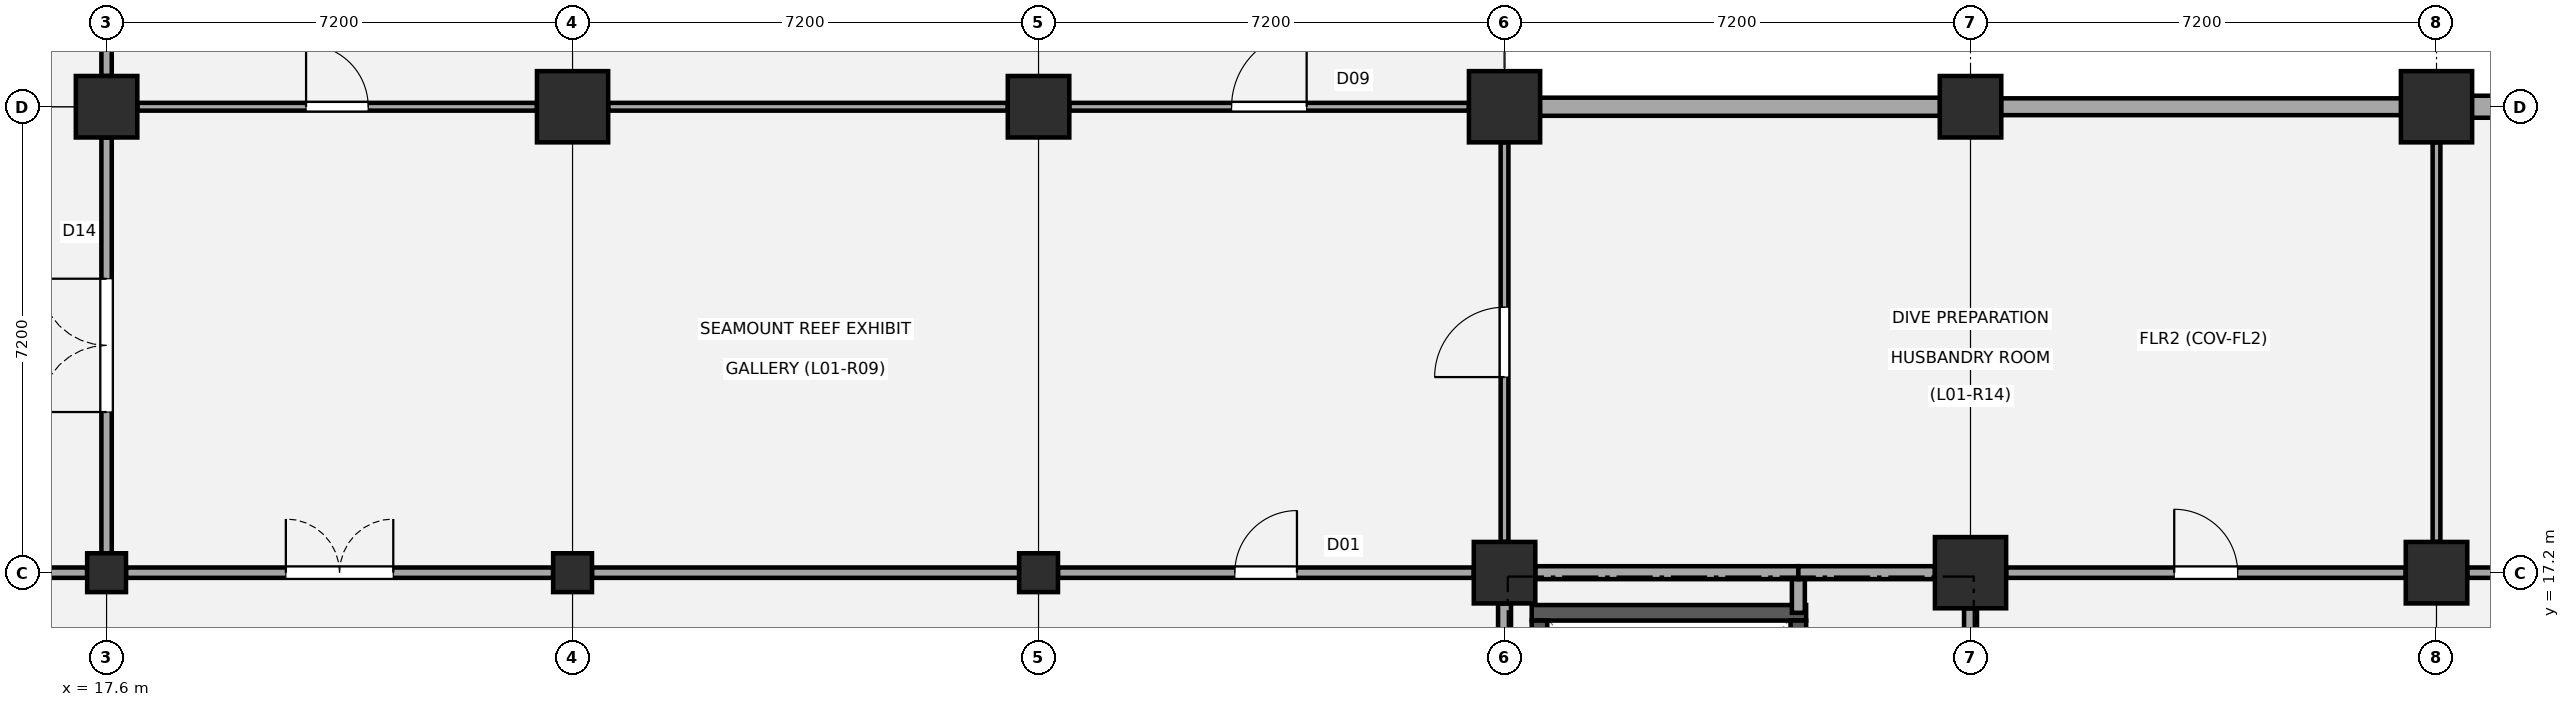
"""IFC4 building model, lengths in metres.
Left out: names, types, materials, properties, quantities, classifications, styles, units other than length and angle.
Written with IfcOpenShell. Run it as: python <this file> out.ifc"""

import sys

from ifc_helpers import new_model, si_unit, direction, frame, frame_2d, origin, origin_2d, place, context, subcontext, project, spatial, rectangle, extrude, element, fill, save


model = new_model("IFC4")
c1 = context("Model", 3, precision=1e-05, world=origin(), true_north=direction((0.0, 1.0)))
c2 = subcontext(c1, "Body", "Model", "MODEL_VIEW")
j1 = project(units=[si_unit("LENGTHUNIT", "METRE"), si_unit("PLANEANGLEUNIT", "RADIAN")], contexts=[c1])
p1 = place(None, origin())
s1 = spatial("IfcSite", under=j1, at=p1, CompositionType="ELEMENT")
p2 = place(p1, origin())
s2 = spatial("IfcBuilding", under=s1, at=p2, CompositionType="ELEMENT")
p3 = place(p2, frame((0.0, 0.0, 4.68)))
s3 = spatial("IfcBuildingStorey", under=s2, at=p3, CompositionType="ELEMENT", Elevation=4.68)
p4 = place(p3, frame((17.6, 17.2, 0.0), z_axis=(0.0, 0.0, 1.0), x_axis=(1.0, 0.0, 0.0)))
e1 = element("IfcColumn", 1, at=p4, inside=s3, PredefinedType="COLUMN", context=c2, shape_type="SweptSolid", body=[
    extrude(rectangle(XDim=0.6, YDim=0.6, at=origin_2d()), origin(), (0.0, 0.0, 1.0), 4.5),
])
p5 = place(p3, frame((17.6, 24.4, 0.0), z_axis=(0.0, 0.0, 1.0), x_axis=(1.0, 0.0, 0.0)))
e2 = element("IfcColumn", 2, at=p5, inside=s3, PredefinedType="COLUMN", context=c2, shape_type="SweptSolid", body=[
    extrude(rectangle(XDim=0.95, YDim=0.95, at=origin_2d()), origin(), (0.0, 0.0, 1.0), 4.5),
])
p6 = place(p3, frame((24.8, 17.2, 0.0), z_axis=(0.0, 0.0, 1.0), x_axis=(1.0, 0.0, 0.0)))
e3 = element("IfcColumn", 3, at=p6, inside=s3, PredefinedType="COLUMN", context=c2, shape_type="SweptSolid", body=[
    extrude(rectangle(XDim=0.6, YDim=0.6, at=origin_2d()), origin(), (0.0, 0.0, 1.0), 4.5),
])
p7 = place(p3, frame((24.8, 24.4, 0.0), z_axis=(0.0, 0.0, 1.0), x_axis=(1.0, 0.0, 0.0)))
e4 = element("IfcColumn", 4, at=p7, inside=s3, PredefinedType="COLUMN", context=c2, shape_type="SweptSolid", body=[
    extrude(rectangle(XDim=1.1, YDim=1.1, at=origin_2d()), origin(), (0.0, 0.0, 1.0), 4.5),
])
p8 = place(p3, frame((32.0, 17.2, 0.0), z_axis=(0.0, 0.0, 1.0), x_axis=(1.0, 0.0, 0.0)))
e5 = element("IfcColumn", 5, at=p8, inside=s3, PredefinedType="COLUMN", context=c2, shape_type="SweptSolid", body=[
    extrude(rectangle(XDim=0.6, YDim=0.6, at=origin_2d()), origin(), (0.0, 0.0, 1.0), 4.5),
])
for number, where, z_axis, x_axis in (
    (6, (32.0, 24.4, 0.0), (0.0, 0.0, 1.0), (1.0, 0.0, 0.0)),
    (7, (39.2, 17.2, 0.0), (0.0, 0.0, 1.0), (1.0, 0.0, 0.0)),
):
    element("IfcColumn", number, at=place(p3, frame(where, z_axis=z_axis, x_axis=x_axis)), inside=s3, PredefinedType="COLUMN", context=c2, shape_type="SweptSolid", body=[
        extrude(rectangle(XDim=0.95, YDim=0.95, at=origin_2d()), origin(), (0.0, 0.0, 1.0), 4.5),
    ])
for number, where, z_axis, x_axis in (
    (8, (39.2, 24.4, 0.0), (0.0, 0.0, 1.0), (1.0, 0.0, 0.0)),
    (9, (46.4, 17.2, 0.0), (0.0, 0.0, 1.0), (1.0, 0.0, 0.0)),
):
    element("IfcColumn", number, at=place(p3, frame(where, z_axis=z_axis, x_axis=x_axis)), inside=s3, PredefinedType="COLUMN", context=c2, shape_type="SweptSolid", body=[
        extrude(rectangle(XDim=1.1, YDim=1.1, at=origin_2d()), origin(), (0.0, 0.0, 1.0), 4.5),
    ])
for number, where, z_axis, x_axis in (
    (10, (46.4, 24.4, 0.0), (0.0, 0.0, 1.0), (1.0, 0.0, 0.0)),
    (11, (53.6, 17.2, 0.0), (0.0, 0.0, 1.0), (1.0, 0.0, 0.0)),
):
    element("IfcColumn", number, at=place(p3, frame(where, z_axis=z_axis, x_axis=x_axis)), inside=s3, PredefinedType="COLUMN", context=c2, shape_type="SweptSolid", body=[
        extrude(rectangle(XDim=0.95, YDim=0.95, at=origin_2d()), origin(), (0.0, 0.0, 1.0), 4.5),
    ])
p9 = place(p3, frame((53.6, 24.4, 0.0), z_axis=(0.0, 0.0, 1.0), x_axis=(1.0, 0.0, 0.0)))
e12 = element("IfcColumn", 12, at=p9, inside=s3, PredefinedType="COLUMN", context=c2, shape_type="SweptSolid", body=[
    extrude(rectangle(XDim=1.1, YDim=1.1, at=origin_2d()), origin(), (0.0, 0.0, 1.0), 4.5),
])
p10 = place(p3, frame((39.745, 24.4, 0.0), z_axis=(0.0, 0.0, 1.0), x_axis=(1.0, 0.0, 0.0)))
e13 = element("IfcWall", 13, at=p10, inside=s3, PredefinedType="STANDARD", context=c2, shape_type="SweptSolid", body=[
    extrude(rectangle(XDim=6.185, YDim=0.28, at=frame_2d((3.092, 0.0))), origin(), (0.0, 0.0, 1.0), 3.51),
])
p11 = place(p3, frame((46.87, 24.4, 0.0), z_axis=(0.0, 0.0, 1.0), x_axis=(1.0, 0.0, 0.0)))
e14 = element("IfcWall", 14, at=p11, inside=s3, PredefinedType="STANDARD", context=c2, shape_type="SweptSolid", body=[
    extrude(rectangle(XDim=6.185, YDim=0.26, at=frame_2d((3.092, 0.0))), origin(), (0.0, 0.0, 1.0), 3.49),
])
p12 = place(p3, frame((54.145, 24.4, 0.0), z_axis=(0.0, 0.0, 1.0), x_axis=(1.0, 0.0, 0.0)))
e15 = element("IfcWall", 15, at=p12, inside=s3, PredefinedType="STANDARD", context=c2, shape_type="SweptSolid", body=[
    extrude(rectangle(XDim=6.185, YDim=0.34, at=frame_2d((3.093, 0.0))), origin(), (0.0, 0.0, 1.0), 3.51),
])
p13 = place(p3, frame((39.62, 16.58, 0.0), z_axis=(0.0, 0.0, 1.0), x_axis=(1.0, 0.0, 0.0)))
e16 = element("IfcWall", 16, at=p13, inside=s3, PredefinedType="SHEAR", context=c2, shape_type="SweptSolid", body=[
    extrude(rectangle(XDim=4.24, YDim=0.24, at=frame_2d((2.12, 0.0))), origin(), (0.0, 0.0, 1.0), 4.2),
])
p14 = place(p3, frame((39.74, 10.74, 0.0), z_axis=(0.0, 0.0, 1.0), x_axis=(0.0, 1.0, 0.0)))
e17 = element("IfcWall", 17, at=p14, inside=s3, PredefinedType="SHEAR", context=c2, shape_type="SweptSolid", body=[
    extrude(rectangle(XDim=5.72, YDim=0.24, at=frame_2d((2.86, 0.0))), origin(), (0.0, 0.0, 1.0), 4.2),
])
p15 = place(p3, frame((43.74, 10.74, 0.0), z_axis=(0.0, 0.0, 1.0), x_axis=(0.0, 1.0, 0.0)))
e18 = element("IfcWall", 18, at=p15, inside=s3, PredefinedType="SHEAR", context=c2, shape_type="SweptSolid", body=[
    extrude(rectangle(XDim=5.72, YDim=0.24, at=frame_2d((2.86, 0.0))), origin(), (0.0, 0.0, 1.0), 4.2),
])
p16 = place(p15, frame((0.22, 0.0, 0.0)))
e19 = element("IfcOpeningElement", 19, at=p16, cuts=e18, PredefinedType="OPENING", context=c2, shape_type="SweptSolid", body=[
    extrude(rectangle(XDim=1.12, YDim=2.15, at=frame_2d((0.56, 1.075))), frame((0.0, 0.13, 0.0), z_axis=(0.0, -1.0, 0.0), x_axis=(1.0, 0.0, 0.0)), (0.0, 0.0, 1.0), 0.26),
])
p17 = place(p3, frame((43.74, 16.58, 0.0), z_axis=(0.0, 0.0, 1.0), x_axis=(0.0, 1.0, 0.0)))
e20 = element("IfcWall", 20, at=p17, inside=s3, PredefinedType="PARTITIONING", context=c2, shape_type="SweptSolid", body=[
    extrude(rectangle(XDim=0.62, YDim=0.2, at=frame_2d((0.31, 0.0))), origin(), (0.0, 0.0, 1.0), 3.59),
])
p18 = place(p3, frame((39.2, 10.55, 0.0), z_axis=(0.0, 0.0, 1.0), x_axis=(0.0, 1.0, 0.0)))
e21 = element("IfcWall", 21, at=p18, inside=s3, PredefinedType="PARTITIONING", context=c2, shape_type="SweptSolid", body=[
    extrude(rectangle(XDim=6.175, YDim=0.2, at=frame_2d((3.087, 0.0))), origin(), (0.0, 0.0, 1.0), 3.59),
])
p19 = place(p3, frame((46.4, 10.475, 0.0), z_axis=(0.0, 0.0, 1.0), x_axis=(0.0, 1.0, 0.0)))
e22 = element("IfcWall", 22, at=p19, inside=s3, PredefinedType="PARTITIONING", context=c2, shape_type="SweptSolid", body=[
    extrude(rectangle(XDim=6.175, YDim=0.2, at=frame_2d((3.087, 0.0))), origin(), (0.0, 0.0, 1.0), 3.59),
])
p20 = place(p19, frame((2.577, 0.0, 0.0)))
e23 = element("IfcOpeningElement", 23, at=p20, cuts=e22, PredefinedType="OPENING", context=c2, shape_type="SweptSolid", body=[
    extrude(rectangle(XDim=1.02, YDim=2.15, at=frame_2d((0.51, 1.075))), frame((0.0, 0.11, 0.0), z_axis=(0.0, -1.0, 0.0), x_axis=(1.0, 0.0, 0.0)), (0.0, 0.0, 1.0), 0.22),
])
p21 = place(p3, frame((39.675, 17.2, 0.0), z_axis=(0.0, 0.0, 1.0), x_axis=(1.0, 0.0, 0.0)))
e24 = element("IfcWall", 24, at=p21, inside=s3, PredefinedType="PARTITIONING", context=c2, shape_type="SweptSolid", body=[
    extrude(rectangle(XDim=4.065, YDim=0.2, at=frame_2d((2.032, 0.0))), origin(), (0.0, 0.0, 1.0), 3.59),
])
p22 = place(p3, frame((43.74, 17.2, 0.0), z_axis=(0.0, 0.0, 1.0), x_axis=(1.0, 0.0, 0.0)))
e25 = element("IfcWall", 25, at=p22, inside=s3, PredefinedType="PARTITIONING", context=c2, shape_type="SweptSolid", body=[
    extrude(rectangle(XDim=2.11, YDim=0.2, at=frame_2d((1.055, 0.0))), origin(), (0.0, 0.0, 1.0), 3.59),
])
p23 = place(p3, frame((10.7, 17.2, 0.0), z_axis=(0.0, 0.0, 1.0), x_axis=(1.0, 0.0, 0.0)))
e26 = element("IfcWall", 26, at=p23, inside=s3, PredefinedType="PARTITIONING", context=c2, shape_type="SweptSolid", body=[
    extrude(rectangle(XDim=6.6, YDim=0.16, at=frame_2d((3.3, 0.0))), origin(), (0.0, 0.0, 1.0), 3.65),
])
p24 = place(p23, frame((2.37, 0.0, 0.0)))
e27 = element("IfcOpeningElement", 27, at=p24, cuts=e26, PredefinedType="OPENING", context=c2, shape_type="SweptSolid", body=[
    extrude(rectangle(XDim=1.86, YDim=2.26, at=frame_2d((0.93, 1.13))), frame((0.0, 0.09, 0.0), z_axis=(0.0, -1.0, 0.0), x_axis=(1.0, 0.0, 0.0)), (0.0, 0.0, 1.0), 0.18),
])
p25 = place(p3, frame((17.6, 17.5, 0.0), z_axis=(0.0, 0.0, 1.0), x_axis=(0.0, 1.0, 0.0)))
e28 = element("IfcWall", 28, at=p25, inside=s3, PredefinedType="PARTITIONING", context=c2, shape_type="SweptSolid", body=[
    extrude(rectangle(XDim=6.425, YDim=0.16, at=frame_2d((3.212, 0.0))), origin(), (0.0, 0.0, 1.0), 3.6),
])
p26 = place(p25, frame((2.183, 0.0, 0.0)))
e29 = element("IfcOpeningElement", 29, at=p26, cuts=e28, PredefinedType="OPENING", context=c2, shape_type="SweptSolid", body=[
    extrude(rectangle(XDim=2.06, YDim=2.28, at=frame_2d((1.03, 1.14))), frame((0.0, 0.09, 0.0), z_axis=(0.0, -1.0, 0.0), x_axis=(1.0, 0.0, 0.0)), (0.0, 0.0, 1.0), 0.18),
])
p27 = place(p3, frame((17.6, 24.875, 0.0), z_axis=(0.0, 0.0, 1.0), x_axis=(0.0, 1.0, 0.0)))
e30 = element("IfcWall", 30, at=p27, inside=s3, PredefinedType="PARTITIONING", context=c2, shape_type="SweptSolid", body=[
    extrude(rectangle(XDim=6.175, YDim=0.16, at=frame_2d((3.087, 0.0))), origin(), (0.0, 0.0, 1.0), 3.59),
])
p28 = place(p27, frame((2.548, 0.0, 0.0)))
e31 = element("IfcOpeningElement", 31, at=p28, cuts=e30, PredefinedType="OPENING", context=c2, shape_type="SweptSolid", body=[
    extrude(rectangle(XDim=1.08, YDim=2.16, at=frame_2d((0.54, 1.08))), frame((0.0, 0.09, 0.0), z_axis=(0.0, -1.0, 0.0), x_axis=(1.0, 0.0, 0.0)), (0.0, 0.0, 1.0), 0.18),
])
p29 = place(p3, frame((17.9, 17.2, 0.0), z_axis=(0.0, 0.0, 1.0), x_axis=(1.0, 0.0, 0.0)))
e32 = element("IfcWall", 32, at=p29, inside=s3, PredefinedType="PARTITIONING", context=c2, shape_type="SweptSolid", body=[
    extrude(rectangle(XDim=6.6, YDim=0.16, at=frame_2d((3.3, 0.0))), origin(), (0.0, 0.0, 1.0), 3.6),
])
p30 = place(p29, frame((2.47, 0.0, 0.0)))
e33 = element("IfcOpeningElement", 33, at=p30, cuts=e32, PredefinedType="OPENING", context=c2, shape_type="SweptSolid", body=[
    extrude(rectangle(XDim=1.66, YDim=2.22, at=frame_2d((0.83, 1.11))), frame((0.0, 0.09, 0.0), z_axis=(0.0, -1.0, 0.0), x_axis=(1.0, 0.0, 0.0)), (0.0, 0.0, 1.0), 0.18),
])
p31 = place(p3, frame((18.075, 24.4, 0.0), z_axis=(0.0, 0.0, 1.0), x_axis=(1.0, 0.0, 0.0)))
e34 = element("IfcWall", 34, at=p31, inside=s3, PredefinedType="PARTITIONING", context=c2, shape_type="SweptSolid", body=[
    extrude(rectangle(XDim=6.175, YDim=0.12, at=frame_2d((3.087, 0.0))), origin(), (0.0, 0.0, 1.0), 3.61),
])
p32 = place(p31, frame((2.607, 0.0, 0.0)))
e35 = element("IfcOpeningElement", 35, at=p32, cuts=e34, PredefinedType="OPENING", context=c2, shape_type="SweptSolid", body=[
    extrude(rectangle(XDim=0.96, YDim=2.1, at=frame_2d((0.48, 1.05))), frame((0.0, 0.07, 0.0), z_axis=(0.0, -1.0, 0.0), x_axis=(1.0, 0.0, 0.0)), (0.0, 0.0, 1.0), 0.14),
])
p33 = place(p3, frame((25.1, 17.2, 0.0), z_axis=(0.0, 0.0, 1.0), x_axis=(1.0, 0.0, 0.0)))
e36 = element("IfcWall", 36, at=p33, inside=s3, PredefinedType="PARTITIONING", context=c2, shape_type="SweptSolid", body=[
    extrude(rectangle(XDim=6.6, YDim=0.16, at=frame_2d((3.3, 0.0))), origin(), (0.0, 0.0, 1.0), 3.65),
])
p34 = place(p3, frame((25.35, 24.4, 0.0), z_axis=(0.0, 0.0, 1.0), x_axis=(1.0, 0.0, 0.0)))
e37 = element("IfcWall", 37, at=p34, inside=s3, PredefinedType="PARTITIONING", context=c2, shape_type="SweptSolid", body=[
    extrude(rectangle(XDim=6.175, YDim=0.12, at=frame_2d((3.087, 0.0))), origin(), (0.0, 0.0, 1.0), 3.54),
])
p35 = place(p3, frame((32.3, 17.2, 0.0), z_axis=(0.0, 0.0, 1.0), x_axis=(1.0, 0.0, 0.0)))
e38 = element("IfcWall", 38, at=p35, inside=s3, PredefinedType="PARTITIONING", context=c2, shape_type="SweptSolid", body=[
    extrude(rectangle(XDim=6.425, YDim=0.16, at=frame_2d((3.212, 0.0))), origin(), (0.0, 0.0, 1.0), 3.6),
])
p36 = place(p35, frame((2.732, 0.0, 0.0)))
e39 = element("IfcOpeningElement", 39, at=p36, cuts=e38, PredefinedType="OPENING", context=c2, shape_type="SweptSolid", body=[
    extrude(rectangle(XDim=0.96, YDim=2.1, at=frame_2d((0.48, 1.05))), frame((0.0, 0.09, 0.0), z_axis=(0.0, -1.0, 0.0), x_axis=(1.0, 0.0, 0.0)), (0.0, 0.0, 1.0), 0.18),
])
p37 = place(p3, frame((39.2, 17.675, 0.0), z_axis=(0.0, 0.0, 1.0), x_axis=(0.0, 1.0, 0.0)))
e40 = element("IfcWall", 40, at=p37, inside=s3, PredefinedType="PARTITIONING", context=c2, shape_type="SweptSolid", body=[
    extrude(rectangle(XDim=6.175, YDim=0.12, at=frame_2d((3.087, 0.0))), origin(), (0.0, 0.0, 1.0), 3.56),
])
p38 = place(p37, frame((2.548, 0.0, 0.0)))
e41 = element("IfcOpeningElement", 41, at=p38, cuts=e40, PredefinedType="OPENING", context=c2, shape_type="SweptSolid", body=[
    extrude(rectangle(XDim=1.08, YDim=2.16, at=frame_2d((0.54, 1.08))), frame((0.0, 0.07, 0.0), z_axis=(0.0, -1.0, 0.0), x_axis=(1.0, 0.0, 0.0)), (0.0, 0.0, 1.0), 0.14),
])
p39 = place(p3, frame((32.475, 24.4, 0.0), z_axis=(0.0, 0.0, 1.0), x_axis=(1.0, 0.0, 0.0)))
e42 = element("IfcWall", 42, at=p39, inside=s3, PredefinedType="PARTITIONING", context=c2, shape_type="SweptSolid", body=[
    extrude(rectangle(XDim=6.175, YDim=0.12, at=frame_2d((3.087, 0.0))), origin(), (0.0, 0.0, 1.0), 3.61),
])
p40 = place(p39, frame((2.508, 0.0, 0.0)))
e43 = element("IfcOpeningElement", 43, at=p40, cuts=e42, PredefinedType="OPENING", context=c2, shape_type="SweptSolid", body=[
    extrude(rectangle(XDim=1.16, YDim=2.18, at=frame_2d((0.58, 1.09))), frame((0.0, 0.07, 0.0), z_axis=(0.0, -1.0, 0.0), x_axis=(1.0, 0.0, 0.0)), (0.0, 0.0, 1.0), 0.14),
])
p41 = place(p3, frame((46.95, 17.2, 0.0), z_axis=(0.0, 0.0, 1.0), x_axis=(1.0, 0.0, 0.0)))
e44 = element("IfcWall", 44, at=p41, inside=s3, PredefinedType="PARTITIONING", context=c2, shape_type="SweptSolid", body=[
    extrude(rectangle(XDim=6.175, YDim=0.16, at=frame_2d((3.087, 0.0))), origin(), (0.0, 0.0, 1.0), 3.54),
])
p42 = place(p41, frame((2.597, 0.0, 0.0)))
e45 = element("IfcOpeningElement", 45, at=p42, cuts=e44, PredefinedType="OPENING", context=c2, shape_type="SweptSolid", body=[
    extrude(rectangle(XDim=0.98, YDim=2.12, at=frame_2d((0.49, 1.06))), frame((0.0, 0.09, 0.0), z_axis=(0.0, -1.0, 0.0), x_axis=(1.0, 0.0, 0.0)), (0.0, 0.0, 1.0), 0.18),
])
p43 = place(p3, frame((53.6, 17.675, 0.0), z_axis=(0.0, 0.0, 1.0), x_axis=(0.0, 1.0, 0.0)))
e46 = element("IfcWall", 46, at=p43, inside=s3, PredefinedType="PARTITIONING", context=c2, shape_type="SweptSolid", body=[
    extrude(rectangle(XDim=6.175, YDim=0.12, at=frame_2d((3.087, 0.0))), origin(), (0.0, 0.0, 1.0), 3.54),
])
p44 = place(p3, frame((54.075, 17.2, 0.0), z_axis=(0.0, 0.0, 1.0), x_axis=(1.0, 0.0, 0.0)))
e47 = element("IfcWall", 47, at=p44, inside=s3, PredefinedType="PARTITIONING", context=c2, shape_type="SweptSolid", body=[
    extrude(rectangle(XDim=6.175, YDim=0.16, at=frame_2d((3.087, 0.0))), origin(), (0.0, 0.0, 1.0), 3.59),
])
p45 = place(p30, origin())
e48 = element("IfcDoor", 48, at=p45, inside=s3, OperationType="DOUBLE_DOOR_SINGLE_SWING", PredefinedType="DOOR", context=c2, shape_type="SweptSolid", body=[
    extrude(rectangle(XDim=1.66, YDim=2.22, at=frame_2d((0.83, 1.11))), frame((0.0, 0.025, 0.0), z_axis=(0.0, -1.0, 0.0), x_axis=(1.0, 0.0, 0.0)), (0.0, 0.0, 1.0), 0.05),
])
fill(e33, e48)
p46 = place(p36, origin())
e49 = element("IfcDoor", 49, at=p46, inside=s3, OperationType="SINGLE_SWING_RIGHT", PredefinedType="DOOR", context=c2, shape_type="SweptSolid", body=[
    extrude(rectangle(XDim=0.96, YDim=2.1, at=frame_2d((0.48, 1.05))), frame((0.0, 0.025, 0.0), z_axis=(0.0, -1.0, 0.0), x_axis=(1.0, 0.0, 0.0)), (0.0, 0.0, 1.0), 0.05),
])
fill(e39, e49)
p47 = place(p26, origin())
e50 = element("IfcDoor", 50, at=p47, inside=s3, OperationType="DOUBLE_DOOR_SINGLE_SWING", PredefinedType="DOOR", context=c2, shape_type="SweptSolid", body=[
    extrude(rectangle(XDim=2.06, YDim=2.28, at=frame_2d((1.03, 1.14))), frame((0.0, 0.025, 0.0), z_axis=(0.0, -1.0, 0.0), x_axis=(1.0, 0.0, 0.0)), (0.0, 0.0, 1.0), 0.05),
])
fill(e29, e50)
p48 = place(p32, origin())
e51 = element("IfcDoor", 51, at=p48, inside=s3, OperationType="SINGLE_SWING_LEFT", PredefinedType="DOOR", context=c2, shape_type="SweptSolid", body=[
    extrude(rectangle(XDim=0.96, YDim=2.1, at=frame_2d((0.48, 1.05))), frame((0.0, 0.025, 0.0), z_axis=(0.0, -1.0, 0.0), x_axis=(1.0, 0.0, 0.0)), (0.0, 0.0, 1.0), 0.05),
])
fill(e35, e51)
p49 = place(p40, origin())
e52 = element("IfcDoor", 52, at=p49, inside=s3, OperationType="SINGLE_SWING_RIGHT", PredefinedType="DOOR", context=c2, shape_type="SweptSolid", body=[
    extrude(rectangle(XDim=1.16, YDim=2.18, at=frame_2d((0.58, 1.09))), frame((0.0, 0.025, 0.0), z_axis=(0.0, -1.0, 0.0), x_axis=(1.0, 0.0, 0.0)), (0.0, 0.0, 1.0), 0.05),
])
fill(e43, e52)
p50 = place(p38, origin())
e53 = element("IfcDoor", 53, at=p50, inside=s3, OperationType="SINGLE_SWING_LEFT", PredefinedType="DOOR", context=c2, shape_type="SweptSolid", body=[
    extrude(rectangle(XDim=1.08, YDim=2.16, at=frame_2d((0.54, 1.08))), frame((0.0, 0.025, 0.0), z_axis=(0.0, -1.0, 0.0), x_axis=(1.0, 0.0, 0.0)), (0.0, 0.0, 1.0), 0.05),
])
fill(e41, e53)
p51 = place(p42, origin())
e54 = element("IfcDoor", 54, at=p51, inside=s3, OperationType="SINGLE_SWING_LEFT", PredefinedType="DOOR", context=c2, shape_type="SweptSolid", body=[
    extrude(rectangle(XDim=0.98, YDim=2.12, at=frame_2d((0.49, 1.06))), frame((0.0, 0.025, 0.0), z_axis=(0.0, -1.0, 0.0), x_axis=(1.0, 0.0, 0.0)), (0.0, 0.0, 1.0), 0.05),
])
fill(e45, e54)
save(model, sys.argv[1])
